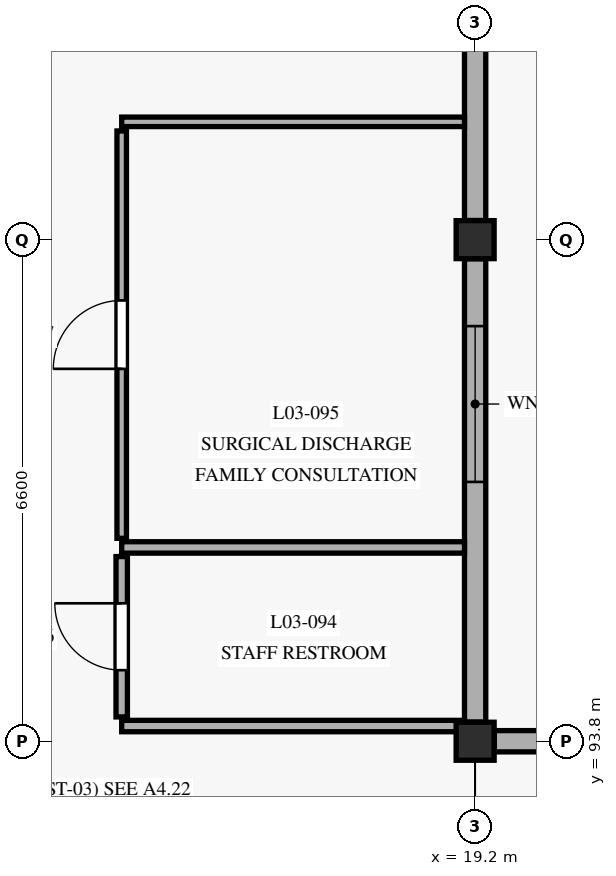
"""IFC4 building model, lengths in metres.
Left out: names, types, materials, properties, quantities, classifications, styles, units other than length and angle.
Written with IfcOpenShell. Run it as: python <this file> out.ifc"""

import sys

from ifc_helpers import new_model, si_unit, direction, frame, frame_2d, origin, origin_with_axes, origin_2d, place, context, subcontext, project, spatial, rectangle, extrude, element, fill, save


model = new_model("IFC4")
c1 = context("Model", 3, precision=1e-05, world=origin(), true_north=direction((0.0, 1.0)))
c2 = subcontext(c1, "Body", "Model", "MODEL_VIEW")
j1 = project(units=[si_unit("LENGTHUNIT", "METRE"), si_unit("PLANEANGLEUNIT", "RADIAN")], contexts=[c1])
p1 = place(None, origin())
s1 = spatial("IfcSite", under=j1, at=p1, CompositionType="ELEMENT")
p2 = place(p1, origin())
s2 = spatial("IfcBuilding", under=s1, at=p2, CompositionType="ELEMENT")
p3 = place(p2, frame((0.0, 0.0, 9.3)))
s3 = spatial("IfcBuildingStorey", under=s2, at=p3, CompositionType="ELEMENT", Elevation=9.3)
for number, where, z_axis, x_axis in (
    (1, (19.2, 93.8, 0.0), (0.0, 0.0, 1.0), (1.0, 0.0, 0.0)),
    (2, (19.2, 100.4, 0.0), (0.0, 0.0, 1.0), (1.0, 0.0, 0.0)),
):
    element("IfcColumn", number, at=place(p3, frame(where, z_axis=z_axis, x_axis=x_axis)), inside=s3, PredefinedType="COLUMN", context=c2, shape_type="SweptSolid", body=[
        extrude(rectangle(XDim=0.5, YDim=0.5, at=origin_2d()), origin(), (0.0, 0.0, 1.0), 4.2),
    ])
p4 = place(p3, frame((19.2, 94.052, 0.0), z_axis=(0.0, 0.0, 1.0), x_axis=(0.0, 1.0, 0.0)))
e3 = element("IfcWall", 3, at=p4, inside=s3, PredefinedType="SOLIDWALL", context=c2, shape_type="SweptSolid", body=[
    extrude(rectangle(XDim=6.096, YDim=0.28, at=frame_2d((3.048, 0.0))), origin(), (0.0, 0.0, 1.0), 3.57),
])
p5 = place(p4, frame((3.16, 0.0, 0.8)))
e4 = element("IfcOpeningElement", 4, at=p5, cuts=e3, PredefinedType="OPENING", context=c2, shape_type="SweptSolid", body=[
    extrude(rectangle(XDim=2.05, YDim=1.95, at=frame_2d((1.025, 0.975))), frame((0.0, 0.15, 0.0), z_axis=(0.0, -1.0, 0.0), x_axis=(1.0, 0.0, 0.0)), (0.0, 0.0, 1.0), 0.3),
])
p6 = place(p3, frame((19.2, 100.652, 0.0), z_axis=(0.0, 0.0, 1.0), x_axis=(0.0, 1.0, 0.0)))
e5 = element("IfcWall", 5, at=p6, inside=s3, PredefinedType="SOLIDWALL", context=c2, shape_type="SweptSolid", body=[
    extrude(rectangle(XDim=6.096, YDim=0.28, at=frame_2d((3.048, 0.0))), origin(), (0.0, 0.0, 1.0), 3.57),
])
p7 = place(p6, frame((2.478, 0.0, 0.0)))
e6 = element("IfcOpeningElement", 6, at=p7, cuts=e5, PredefinedType="OPENING", context=c2, shape_type="SweptSolid", body=[
    extrude(rectangle(XDim=1.14, YDim=2.3, at=frame_2d((0.57, 1.15))), frame((0.0, 0.15, 0.0), z_axis=(0.0, -1.0, 0.0), x_axis=(1.0, 0.0, 0.0)), (0.0, 0.0, 1.0), 0.3),
])
p8 = place(p3, frame((21.948, 93.8, 0.0), z_axis=(0.0, 0.0, 1.0), x_axis=(-1.0, 0.0, 0.0)))
e7 = element("IfcWall", 7, at=p8, inside=s3, PredefinedType="SOLIDWALL", context=c2, shape_type="SweptSolid", body=[
    extrude(rectangle(XDim=2.496, YDim=0.28, at=frame_2d((1.248, 0.0))), origin(), (0.0, 0.0, 1.0), 3.59),
])
p9 = place(p8, frame((0.723, 0.0, 0.85)))
e8 = element("IfcOpeningElement", 8, at=p9, cuts=e7, PredefinedType="OPENING", context=c2, shape_type="SweptSolid", body=[
    extrude(rectangle(XDim=1.05, YDim=2.2, at=frame_2d((0.525, 1.1))), frame((0.0, 0.15, 0.0), z_axis=(0.0, -1.0, 0.0), x_axis=(1.0, 0.0, 0.0)), (0.0, 0.0, 1.0), 0.3),
])
p10 = place(p3, frame((14.55, 94.12, 0.0), z_axis=(0.0, 0.0, 1.0), x_axis=(0.0, 1.0, 0.0)))
e9 = element("IfcWall", 9, at=p10, inside=s3, PredefinedType="PARTITIONING", context=c2, shape_type="SweptSolid", body=[
    extrude(rectangle(XDim=2.11, YDim=0.15, at=frame_2d((1.055, 0.0))), origin(), (0.0, 0.0, 1.0), 3.495),
])
p11 = place(p10, frame((0.615, 0.0, 0.0)))
e10 = element("IfcOpeningElement", 10, at=p11, cuts=e9, PredefinedType="OPENING", context=c2, shape_type="SweptSolid", body=[
    extrude(rectangle(XDim=0.88, YDim=2.1, at=frame_2d((0.44, 1.05))), frame((0.0, 0.085, 0.0), z_axis=(0.0, -1.0, 0.0), x_axis=(1.0, 0.0, 0.0)), (0.0, 0.0, 1.0), 0.17),
])
p12 = place(p3, frame((14.55, 94.0, 0.0), z_axis=(0.0, 0.0, 1.0), x_axis=(1.0, 0.0, 0.0)))
e11 = element("IfcWall", 11, at=p12, inside=s3, PredefinedType="PARTITIONING", context=c2, shape_type="SweptSolid", body=[
    extrude(rectangle(XDim=4.51, YDim=0.15, at=frame_2d((2.255, 0.0))), origin(), (0.0, 0.0, 1.0), 3.495),
])
p13 = place(p3, frame((14.55, 96.35, 0.0), z_axis=(0.0, 0.0, 1.0), x_axis=(1.0, 0.0, 0.0)))
e12 = element("IfcWall", 12, at=p13, inside=s3, PredefinedType="PARTITIONING", context=c2, shape_type="SweptSolid", body=[
    extrude(rectangle(XDim=4.51, YDim=0.15, at=frame_2d((2.255, 0.0))), origin(), (0.0, 0.0, 1.0), 3.565),
])
p14 = place(p3, frame((14.55, 96.47, 0.0), z_axis=(0.0, 0.0, 1.0), x_axis=(0.0, 1.0, 0.0)))
e13 = element("IfcWall", 13, at=p14, inside=s3, PredefinedType="PARTITIONING", context=c2, shape_type="SweptSolid", body=[
    extrude(rectangle(XDim=5.36, YDim=0.125, at=frame_2d((2.68, 0.0))), origin(), (0.0, 0.0, 1.0), 3.495),
])
p15 = place(p14, frame((2.23, 0.0, 0.0)))
e14 = element("IfcOpeningElement", 14, at=p15, cuts=e13, PredefinedType="OPENING", context=c2, shape_type="SweptSolid", body=[
    extrude(rectangle(XDim=0.9, YDim=2.12, at=frame_2d((0.45, 1.06))), frame((0.0, 0.073, 0.0), z_axis=(0.0, -1.0, 0.0), x_axis=(1.0, 0.0, 0.0)), (0.0, 0.0, 1.0), 0.145),
])
p16 = place(p3, frame((14.55, 101.95, 0.0), z_axis=(0.0, 0.0, 1.0), x_axis=(1.0, 0.0, 0.0)))
e15 = element("IfcWall", 15, at=p16, inside=s3, PredefinedType="PARTITIONING", context=c2, shape_type="SweptSolid", body=[
    extrude(rectangle(XDim=4.51, YDim=0.125, at=frame_2d((2.255, 0.0))), origin(), (0.0, 0.0, 1.0), 3.565),
])
p17 = place(p5, origin_with_axes())
e16 = element("IfcWindow", 16, at=p17, inside=s3, PartitioningType="SINGLE_PANEL", PredefinedType="WINDOW", context=c2, shape_type="SweptSolid", body=[
    extrude(rectangle(XDim=2.05, YDim=1.95, at=frame_2d((1.025, 0.975))), frame((0.0, 0.03, 0.0), z_axis=(0.0, -1.0, 0.0), x_axis=(1.0, 0.0, 0.0)), (0.0, 0.0, 1.0), 0.06),
])
fill(e4, e16)
p18 = place(p11, frame((0.88, 0.0, 0.0), z_axis=(0.0, 0.0, 1.0), x_axis=(-1.0, 0.0, 0.0)))
e17 = element("IfcDoor", 17, at=p18, inside=s3, OperationType="SINGLE_SWING_LEFT", PredefinedType="DOOR", context=c2, shape_type="SweptSolid", body=[
    extrude(rectangle(XDim=0.88, YDim=2.1, at=frame_2d((0.44, 1.05))), frame((0.0, 0.025, 0.0), z_axis=(0.0, -1.0, 0.0), x_axis=(1.0, 0.0, 0.0)), (0.0, 0.0, 1.0), 0.05),
])
fill(e10, e17)
p19 = place(p15, frame((0.9, 0.0, 0.0), z_axis=(0.0, 0.0, 1.0), x_axis=(-1.0, 0.0, 0.0)))
e18 = element("IfcDoor", 18, at=p19, inside=s3, OperationType="SINGLE_SWING_RIGHT", PredefinedType="DOOR", context=c2, shape_type="SweptSolid", body=[
    extrude(rectangle(XDim=0.9, YDim=2.12, at=frame_2d((0.45, 1.06))), frame((0.0, 0.025, 0.0), z_axis=(0.0, -1.0, 0.0), x_axis=(1.0, 0.0, 0.0)), (0.0, 0.0, 1.0), 0.05),
])
fill(e14, e18)
save(model, sys.argv[1])
